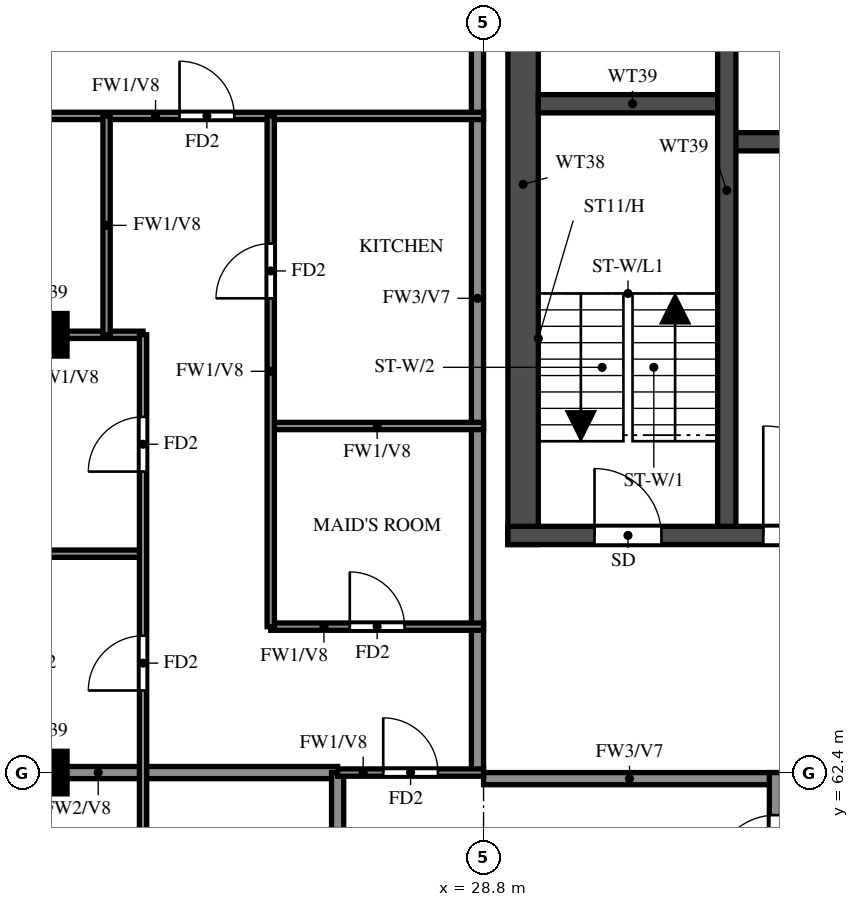
"""IFC4 building model, lengths in metres.
Left out: names, types, materials, properties, quantities, classifications, styles, units other than length and angle.
Written with IfcOpenShell. Run it as: python <this file> out.ifc"""

import sys

from ifc_helpers import new_model, si_unit, direction, frame, frame_2d, origin, origin_2d, place, context, subcontext, project, spatial, rectangle, extrude, source, transform, mapped, element, fill, save


model = new_model("IFC4")
c1 = context("Model", 3, precision=1e-05, world=origin(), true_north=direction((0.0, 1.0)))
c2 = subcontext(c1, "Body", "Model", "MODEL_VIEW")
j1 = project(units=[si_unit("LENGTHUNIT", "METRE"), si_unit("PLANEANGLEUNIT", "RADIAN")], contexts=[c1])
p1 = place(None, origin())
s1 = spatial("IfcSite", under=j1, at=p1, CompositionType="ELEMENT")
p2 = place(p1, origin())
s2 = spatial("IfcBuilding", under=s1, at=p2, CompositionType="ELEMENT")
p3 = place(p2, frame((0.0, 0.0, 267.5)))
s3 = spatial("IfcBuildingStorey", under=s2, at=p3, CompositionType="ELEMENT", Elevation=267.5)
m1 = source(origin(), c2, "Body", "SweptSolid", [
    extrude(rectangle(XDim=0.7, YDim=0.7, at=origin_2d()), origin(), (0.0, 0.0, 1.0), 3.099),
])
for number, where, z_axis, x_axis in (
    (1, (21.6, 62.4, 0.0), (0.0, 0.0, 1.0), (1.0, 0.0, 0.0)),
    (2, (21.6, 69.6, 0.0), (0.0, 0.0, 1.0), (1.0, 0.0, 0.0)),
):
    element("IfcColumn", number, at=place(p3, frame(where, z_axis=z_axis, x_axis=x_axis)), inside=s3, PredefinedType="COLUMN", context=c2, shape_type="MappedRepresentation", body=[
        mapped(m1, transform((0.0, 0.0, 0.0))),
    ])
p4 = place(p3, frame((29.45, 66.15, 0.0), z_axis=(0.0, 0.0, 1.0), x_axis=(0.0, 1.0, 0.0)))
e3 = element("IfcWall", 3, at=p4, inside=s3, PredefinedType="SHEAR", context=c2, shape_type="SweptSolid", body=[
    extrude(rectangle(XDim=11.85, YDim=0.5, at=frame_2d((5.925, 0.0))), origin(), (0.0, 0.0, 1.0), 3.099),
])
p5 = place(p3, frame((29.2, 66.3, 0.0), z_axis=(0.0, 0.0, 1.0), x_axis=(1.0, 0.0, 0.0)))
e4 = element("IfcWall", 4, at=p5, inside=s3, PredefinedType="SHEAR", context=c2, shape_type="SweptSolid", body=[
    extrude(rectangle(XDim=42.4, YDim=0.3, at=frame_2d((21.2, 0.0))), origin(), (0.0, 0.0, 1.0), 3.099),
])
p6 = place(p5, frame((1.425, 0.0, 0.0)))
e5 = element("IfcOpeningElement", 5, at=p6, cuts=e4, PredefinedType="OPENING", context=c2, shape_type="SweptSolid", body=[
    extrude(rectangle(XDim=1.1, YDim=2.1, at=frame_2d((0.55, 1.05))), frame((0.0, 0.16, 0.0), z_axis=(0.0, -1.0, 0.0), x_axis=(1.0, 0.0, 0.0)), (0.0, 0.0, 1.0), 0.32),
])
p7 = place(p5, frame((4.2, 0.0, 0.0)))
e6 = element("IfcOpeningElement", 6, at=p7, cuts=e4, PredefinedType="OPENING", context=c2, shape_type="SweptSolid", body=[
    extrude(rectangle(XDim=1.8, YDim=2.1, at=frame_2d((0.9, 1.05))), frame((0.0, 0.16, 0.0), z_axis=(0.0, -1.0, 0.0), x_axis=(1.0, 0.0, 0.0)), (0.0, 0.0, 1.0), 0.32),
])
p8 = place(p3, frame((32.8, 72.775, 0.0), z_axis=(0.0, 0.0, 1.0), x_axis=(1.0, 0.0, 0.0)))
e7 = element("IfcWall", 7, at=p8, inside=s3, PredefinedType="SHEAR", context=c2, shape_type="SweptSolid", body=[
    extrude(rectangle(XDim=35.2, YDim=0.3, at=frame_2d((17.6, 0.0))), origin(), (0.0, 0.0, 1.0), 3.099),
])
p9 = place(p8, frame((19.8, 0.0, 0.0)))
e8 = element("IfcOpeningElement", 8, at=p9, cuts=e7, PredefinedType="OPENING", context=c2, shape_type="SweptSolid", body=[
    extrude(rectangle(XDim=1.1, YDim=2.1, at=frame_2d((0.55, 1.05))), frame((0.0, 0.16, 0.0), z_axis=(0.0, -1.0, 0.0), x_axis=(1.0, 0.0, 0.0)), (0.0, 0.0, 1.0), 0.32),
])
p10 = place(p8, frame((27.725, 0.0, 0.0)))
e9 = element("IfcOpeningElement", 9, at=p10, cuts=e7, PredefinedType="OPENING", context=c2, shape_type="SweptSolid", body=[
    extrude(rectangle(XDim=1.1, YDim=2.1, at=frame_2d((0.55, 1.05))), frame((0.0, 0.16, 0.0), z_axis=(0.0, -1.0, 0.0), x_axis=(1.0, 0.0, 0.0)), (0.0, 0.0, 1.0), 0.32),
])
p11 = place(p8, frame((30.325, 0.0, 0.0)))
e10 = element("IfcOpeningElement", 10, at=p11, cuts=e7, PredefinedType="OPENING", context=c2, shape_type="SweptSolid", body=[
    extrude(rectangle(XDim=1.1, YDim=2.1, at=frame_2d((0.55, 1.05))), frame((0.0, 0.16, 0.0), z_axis=(0.0, -1.0, 0.0), x_axis=(1.0, 0.0, 0.0)), (0.0, 0.0, 1.0), 0.32),
])
p12 = place(p8, frame((3.825, 0.0, 0.0)))
e11 = element("IfcOpeningElement", 11, at=p12, cuts=e7, PredefinedType="OPENING", context=c2, shape_type="SweptSolid", body=[
    extrude(rectangle(XDim=1.1, YDim=2.1, at=frame_2d((0.55, 1.05))), frame((0.0, 0.16, 0.0), z_axis=(0.0, -1.0, 0.0), x_axis=(1.0, 0.0, 0.0)), (0.0, 0.0, 1.0), 0.32),
])
p13 = place(p8, frame((6.575, 0.0, 0.0)))
e12 = element("IfcOpeningElement", 12, at=p13, cuts=e7, PredefinedType="OPENING", context=c2, shape_type="SweptSolid", body=[
    extrude(rectangle(XDim=1.1, YDim=2.1, at=frame_2d((0.55, 1.05))), frame((0.0, 0.16, 0.0), z_axis=(0.0, -1.0, 0.0), x_axis=(1.0, 0.0, 0.0)), (0.0, 0.0, 1.0), 0.32),
])
p14 = place(p8, frame((9.325, 0.0, 0.0)))
e13 = element("IfcOpeningElement", 13, at=p14, cuts=e7, PredefinedType="OPENING", context=c2, shape_type="SweptSolid", body=[
    extrude(rectangle(XDim=1.1, YDim=2.1, at=frame_2d((0.55, 1.05))), frame((0.0, 0.16, 0.0), z_axis=(0.0, -1.0, 0.0), x_axis=(1.0, 0.0, 0.0)), (0.0, 0.0, 1.0), 0.32),
])
p15 = place(p8, frame((12.075, 0.0, 0.0)))
e14 = element("IfcOpeningElement", 14, at=p15, cuts=e7, PredefinedType="OPENING", context=c2, shape_type="SweptSolid", body=[
    extrude(rectangle(XDim=1.1, YDim=2.1, at=frame_2d((0.55, 1.05))), frame((0.0, 0.16, 0.0), z_axis=(0.0, -1.0, 0.0), x_axis=(1.0, 0.0, 0.0)), (0.0, 0.0, 1.0), 0.32),
])
p16 = place(p8, frame((14.825, 0.0, 0.0)))
e15 = element("IfcOpeningElement", 15, at=p16, cuts=e7, PredefinedType="OPENING", context=c2, shape_type="SweptSolid", body=[
    extrude(rectangle(XDim=1.1, YDim=2.1, at=frame_2d((0.55, 1.05))), frame((0.0, 0.16, 0.0), z_axis=(0.0, -1.0, 0.0), x_axis=(1.0, 0.0, 0.0)), (0.0, 0.0, 1.0), 0.32),
])
p17 = place(p8, frame((17.575, 0.0, 0.0)))
e16 = element("IfcOpeningElement", 16, at=p17, cuts=e7, PredefinedType="OPENING", context=c2, shape_type="SweptSolid", body=[
    extrude(rectangle(XDim=1.1, YDim=2.1, at=frame_2d((0.55, 1.05))), frame((0.0, 0.16, 0.0), z_axis=(0.0, -1.0, 0.0), x_axis=(1.0, 0.0, 0.0)), (0.0, 0.0, 1.0), 0.32),
])
p18 = place(p8, frame((0.95, 0.0, 0.0)))
e17 = element("IfcOpeningElement", 17, at=p18, cuts=e7, PredefinedType="OPENING", context=c2, shape_type="SweptSolid", body=[
    extrude(rectangle(XDim=1.1, YDim=2.1, at=frame_2d((0.55, 1.05))), frame((0.0, 0.16, 0.0), z_axis=(0.0, -1.0, 0.0), x_axis=(1.0, 0.0, 0.0)), (0.0, 0.0, 1.0), 0.32),
])
p19 = place(p3, frame((29.7, 73.4, 0.0), z_axis=(0.0, 0.0, 1.0), x_axis=(1.0, 0.0, 0.0)))
e18 = element("IfcWall", 18, at=p19, inside=s3, PredefinedType="SHEAR", context=c2, shape_type="SweptSolid", body=[
    extrude(rectangle(XDim=3.1, YDim=0.3, at=frame_2d((1.55, 0.0))), origin(), (0.0, 0.0, 1.0), 3.099),
])
p20 = place(p3, frame((32.8, 66.45, 0.0), z_axis=(0.0, 0.0, 1.0), x_axis=(0.0, 1.0, 0.0)))
e19 = element("IfcWall", 19, at=p20, inside=s3, PredefinedType="SHEAR", context=c2, shape_type="SweptSolid", body=[
    extrude(rectangle(XDim=11.05, YDim=0.3, at=frame_2d((5.525, 0.0))), origin(), (0.0, 0.0, 1.0), 3.099),
])
p21 = place(p3, frame((28.8, 62.3, 0.0), z_axis=(0.0, 0.0, 1.0), x_axis=(1.0, 0.0, 0.0)))
e20 = element("IfcWall", 20, at=p21, inside=s3, PredefinedType="SOLIDWALL", context=c2, shape_type="SweptSolid", body=[
    extrude(rectangle(XDim=4.8, YDim=0.2, at=frame_2d((2.4, 0.0))), origin(), (0.0, 0.0, 1.0), 3.099),
])
p22 = place(p3, frame((28.7, 62.4, 0.0), z_axis=(0.0, 0.0, 1.0), x_axis=(0.0, 1.0, 0.0)))
e21 = element("IfcWall", 21, at=p22, inside=s3, PredefinedType="SOLIDWALL", context=c2, shape_type="SweptSolid", body=[
    extrude(rectangle(XDim=15.6, YDim=0.2, at=frame_2d((7.8, 0.0))), origin(), (0.0, 0.0, 1.0), 3.099),
])
p23 = place(p3, frame((33.6, 45.6, 0.0), z_axis=(0.0, 0.0, 1.0), x_axis=(0.0, 1.0, 0.0)))
e22 = element("IfcWall", 22, at=p23, inside=s3, PredefinedType="SOLIDWALL", context=c2, shape_type="SweptSolid", body=[
    extrude(rectangle(XDim=16.8, YDim=0.2, at=frame_2d((8.4, 0.0))), origin(), (0.0, 0.0, 1.0), 3.099),
])
p24 = place(p23, frame((0.7, 0.0, 0.0)))
e23 = element("IfcOpeningElement", 23, at=p24, cuts=e22, PredefinedType="OPENING", context=c2, shape_type="SweptSolid", body=[
    extrude(rectangle(XDim=1.0, YDim=2.1, at=frame_2d((0.5, 1.05))), frame((0.0, 0.11, 0.0), z_axis=(0.0, -1.0, 0.0), x_axis=(1.0, 0.0, 0.0)), (0.0, 0.0, 1.0), 0.22),
])
p25 = place(p23, frame((8.3, 0.0, 0.0)))
e24 = element("IfcOpeningElement", 24, at=p25, cuts=e22, PredefinedType="OPENING", context=c2, shape_type="SweptSolid", body=[
    extrude(rectangle(XDim=1.0, YDim=2.1, at=frame_2d((0.5, 1.05))), frame((0.0, 0.11, 0.0), z_axis=(0.0, -1.0, 0.0), x_axis=(1.0, 0.0, 0.0)), (0.0, 0.0, 1.0), 0.22),
])
p26 = place(p23, frame((15.1, 0.0, 0.0)))
e25 = element("IfcOpeningElement", 25, at=p26, cuts=e22, PredefinedType="OPENING", context=c2, shape_type="SweptSolid", body=[
    extrude(rectangle(XDim=1.0, YDim=2.1, at=frame_2d((0.5, 1.05))), frame((0.0, 0.11, 0.0), z_axis=(0.0, -1.0, 0.0), x_axis=(1.0, 0.0, 0.0)), (0.0, 0.0, 1.0), 0.22),
])
p27 = place(p3, frame((18.525, 62.4, 0.0), z_axis=(0.0, 0.0, 1.0), x_axis=(1.0, 0.0, 0.0)))
e26 = element("IfcWall", 26, at=p27, inside=s3, PredefinedType="SOLIDWALL", context=c2, shape_type="SweptSolid", body=[
    extrude(rectangle(XDim=7.875, YDim=0.2, at=frame_2d((3.938, 0.0))), origin(), (0.0, 0.0, 1.0), 3.099),
])
p28 = place(p3, frame((26.4, 60.0, 0.0), z_axis=(0.0, 0.0, 1.0), x_axis=(0.0, 1.0, 0.0)))
e27 = element("IfcWall", 27, at=p28, inside=s3, PredefinedType="SOLIDWALL", context=c2, shape_type="SweptSolid", body=[
    extrude(rectangle(XDim=2.4, YDim=0.2, at=frame_2d((1.2, 0.0))), origin(), (0.0, 0.0, 1.0), 3.099),
])
p29 = place(p3, frame((26.4, 62.4, 0.0), z_axis=(0.0, 0.0, 1.0), x_axis=(1.0, 0.0, 0.0)))
e28 = element("IfcWall", 28, at=p29, inside=s3, PredefinedType="PARTITIONING", context=c2, shape_type="SweptSolid", body=[
    extrude(rectangle(XDim=2.4, YDim=0.12, at=frame_2d((1.2, 0.0))), origin(), (0.0, 0.0, 1.0), 3.099),
])
p30 = place(p29, frame((0.75, 0.0, 0.0)))
e29 = element("IfcOpeningElement", 29, at=p30, cuts=e28, PredefinedType="OPENING", context=c2, shape_type="SweptSolid", body=[
    extrude(rectangle(XDim=0.9, YDim=2.1, at=frame_2d((0.45, 1.05))), frame((0.0, 0.07, 0.0), z_axis=(0.0, -1.0, 0.0), x_axis=(1.0, 0.0, 0.0)), (0.0, 0.0, 1.0), 0.14),
])
p31 = place(p3, frame((25.3, 64.8, 0.0), z_axis=(0.0, 0.0, 1.0), x_axis=(1.0, 0.0, 0.0)))
e30 = element("IfcWall", 30, at=p31, inside=s3, PredefinedType="PARTITIONING", context=c2, shape_type="SweptSolid", body=[
    extrude(rectangle(XDim=3.5, YDim=0.12, at=frame_2d((1.75, 0.0))), origin(), (0.0, 0.0, 1.0), 3.099),
])
p32 = place(p31, frame((1.3, 0.0, 0.0)))
e31 = element("IfcOpeningElement", 31, at=p32, cuts=e30, PredefinedType="OPENING", context=c2, shape_type="SweptSolid", body=[
    extrude(rectangle(XDim=0.9, YDim=2.1, at=frame_2d((0.45, 1.05))), frame((0.0, 0.07, 0.0), z_axis=(0.0, -1.0, 0.0), x_axis=(1.0, 0.0, 0.0)), (0.0, 0.0, 1.0), 0.14),
])
p33 = place(p3, frame((18.525, 66.0, 0.0), z_axis=(0.0, 0.0, 1.0), x_axis=(1.0, 0.0, 0.0)))
e32 = element("IfcWall", 32, at=p33, inside=s3, PredefinedType="PARTITIONING", context=c2, shape_type="SweptSolid", body=[
    extrude(rectangle(XDim=4.675, YDim=0.12, at=frame_2d((2.337, 0.0))), origin(), (0.0, 0.0, 1.0), 3.099),
])
p34 = place(p3, frame((25.3, 68.1, 0.0), z_axis=(0.0, 0.0, 1.0), x_axis=(1.0, 0.0, 0.0)))
e33 = element("IfcWall", 33, at=p34, inside=s3, PredefinedType="PARTITIONING", context=c2, shape_type="SweptSolid", body=[
    extrude(rectangle(XDim=3.5, YDim=0.12, at=frame_2d((1.75, 0.0))), origin(), (0.0, 0.0, 1.0), 3.099),
])
p35 = place(p3, frame((18.525, 69.6, 0.0), z_axis=(0.0, 0.0, 1.0), x_axis=(1.0, 0.0, 0.0)))
e34 = element("IfcWall", 34, at=p35, inside=s3, PredefinedType="PARTITIONING", context=c2, shape_type="SweptSolid", body=[
    extrude(rectangle(XDim=4.675, YDim=0.12, at=frame_2d((2.337, 0.0))), origin(), (0.0, 0.0, 1.0), 3.099),
])
p36 = place(p35, frame((1.538, 0.0, 0.0)))
e35 = element("IfcOpeningElement", 35, at=p36, cuts=e34, PredefinedType="OPENING", context=c2, shape_type="SweptSolid", body=[
    extrude(rectangle(XDim=0.8, YDim=2.1, at=frame_2d((0.4, 1.05))), frame((0.0, 0.07, 0.0), z_axis=(0.0, -1.0, 0.0), x_axis=(1.0, 0.0, 0.0)), (0.0, 0.0, 1.0), 0.14),
])
p37 = place(p3, frame((18.525, 73.2, 0.0), z_axis=(0.0, 0.0, 1.0), x_axis=(1.0, 0.0, 0.0)))
e36 = element("IfcWall", 36, at=p37, inside=s3, PredefinedType="PARTITIONING", context=c2, shape_type="SweptSolid", body=[
    extrude(rectangle(XDim=10.275, YDim=0.12, at=frame_2d((5.138, 0.0))), origin(), (0.0, 0.0, 1.0), 3.099),
])
p38 = place(p37, frame((5.275, 0.0, 0.0)))
e37 = element("IfcOpeningElement", 37, at=p38, cuts=e36, PredefinedType="OPENING", context=c2, shape_type="SweptSolid", body=[
    extrude(rectangle(XDim=0.9, YDim=2.1, at=frame_2d((0.45, 1.05))), frame((0.0, 0.07, 0.0), z_axis=(0.0, -1.0, 0.0), x_axis=(1.0, 0.0, 0.0)), (0.0, 0.0, 1.0), 0.14),
])
p39 = place(p3, frame((22.6, 69.6, 0.0), z_axis=(0.0, 0.0, 1.0), x_axis=(0.0, 1.0, 0.0)))
e38 = element("IfcWall", 38, at=p39, inside=s3, PredefinedType="PARTITIONING", context=c2, shape_type="SweptSolid", body=[
    extrude(rectangle(XDim=3.6, YDim=0.12, at=frame_2d((1.8, 0.0))), origin(), (0.0, 0.0, 1.0), 3.099),
])
p40 = place(p3, frame((23.2, 48.0, 0.0), z_axis=(0.0, 0.0, 1.0), x_axis=(0.0, 1.0, 0.0)))
e39 = element("IfcWall", 39, at=p40, inside=s3, PredefinedType="PARTITIONING", context=c2, shape_type="SweptSolid", body=[
    extrude(rectangle(XDim=21.6, YDim=0.12, at=frame_2d((10.8, 0.0))), origin(), (0.0, 0.0, 1.0), 3.099),
])
p41 = place(p40, frame((1.35, 0.0, 0.0)))
e40 = element("IfcOpeningElement", 40, at=p41, cuts=e39, PredefinedType="OPENING", context=c2, shape_type="SweptSolid", body=[
    extrude(rectangle(XDim=0.9, YDim=2.1, at=frame_2d((0.45, 1.05))), frame((0.0, 0.07, 0.0), z_axis=(0.0, -1.0, 0.0), x_axis=(1.0, 0.0, 0.0)), (0.0, 0.0, 1.0), 0.14),
])
p42 = place(p40, frame((7.95, 0.0, 0.0)))
e41 = element("IfcOpeningElement", 41, at=p42, cuts=e39, PredefinedType="OPENING", context=c2, shape_type="SweptSolid", body=[
    extrude(rectangle(XDim=1.5, YDim=2.1, at=frame_2d((0.75, 1.05))), frame((0.0, 0.07, 0.0), z_axis=(0.0, -1.0, 0.0), x_axis=(1.0, 0.0, 0.0)), (0.0, 0.0, 1.0), 0.14),
])
p43 = place(p40, frame((12.15, 0.0, 0.0)))
e42 = element("IfcOpeningElement", 42, at=p43, cuts=e39, PredefinedType="OPENING", context=c2, shape_type="SweptSolid", body=[
    extrude(rectangle(XDim=0.9, YDim=2.1, at=frame_2d((0.45, 1.05))), frame((0.0, 0.07, 0.0), z_axis=(0.0, -1.0, 0.0), x_axis=(1.0, 0.0, 0.0)), (0.0, 0.0, 1.0), 0.14),
])
p44 = place(p40, frame((15.75, 0.0, 0.0)))
e43 = element("IfcOpeningElement", 43, at=p44, cuts=e39, PredefinedType="OPENING", context=c2, shape_type="SweptSolid", body=[
    extrude(rectangle(XDim=0.9, YDim=2.1, at=frame_2d((0.45, 1.05))), frame((0.0, 0.07, 0.0), z_axis=(0.0, -1.0, 0.0), x_axis=(1.0, 0.0, 0.0)), (0.0, 0.0, 1.0), 0.14),
])
p45 = place(p40, frame((19.35, 0.0, 0.0)))
e44 = element("IfcOpeningElement", 44, at=p45, cuts=e39, PredefinedType="OPENING", context=c2, shape_type="SweptSolid", body=[
    extrude(rectangle(XDim=0.9, YDim=2.1, at=frame_2d((0.45, 1.05))), frame((0.0, 0.07, 0.0), z_axis=(0.0, -1.0, 0.0), x_axis=(1.0, 0.0, 0.0)), (0.0, 0.0, 1.0), 0.14),
])
p46 = place(p3, frame((25.3, 64.8, 0.0), z_axis=(0.0, 0.0, 1.0), x_axis=(0.0, 1.0, 0.0)))
e45 = element("IfcWall", 45, at=p46, inside=s3, PredefinedType="PARTITIONING", context=c2, shape_type="SweptSolid", body=[
    extrude(rectangle(XDim=8.4, YDim=0.12, at=frame_2d((4.2, 0.0))), origin(), (0.0, 0.0, 1.0), 3.099),
])
p47 = place(p46, frame((5.4, 0.0, 0.0)))
e46 = element("IfcOpeningElement", 46, at=p47, cuts=e45, PredefinedType="OPENING", context=c2, shape_type="SweptSolid", body=[
    extrude(rectangle(XDim=0.9, YDim=2.1, at=frame_2d((0.45, 1.05))), frame((0.0, 0.07, 0.0), z_axis=(0.0, -1.0, 0.0), x_axis=(1.0, 0.0, 0.0)), (0.0, 0.0, 1.0), 0.14),
])
p48 = place(p6, origin())
e47 = element("IfcDoor", 47, at=p48, inside=s3, OperationType="SINGLE_SWING_LEFT", PredefinedType="DOOR", context=c2, shape_type="SweptSolid", body=[
    extrude(rectangle(XDim=1.1, YDim=2.1, at=frame_2d((0.55, 1.05))), frame((0.0, 0.025, 0.0), z_axis=(0.0, -1.0, 0.0), x_axis=(1.0, 0.0, 0.0)), (0.0, 0.0, 1.0), 0.05),
])
fill(e5, e47)
p49 = place(p7, origin())
e48 = element("IfcDoor", 48, at=p49, inside=s3, OperationType="DOUBLE_DOOR_SINGLE_SWING", PredefinedType="DOOR", context=c2, shape_type="SweptSolid", body=[
    extrude(rectangle(XDim=1.8, YDim=2.1, at=frame_2d((0.9, 1.05))), frame((0.0, 0.025, 0.0), z_axis=(0.0, -1.0, 0.0), x_axis=(1.0, 0.0, 0.0)), (0.0, 0.0, 1.0), 0.05),
])
fill(e6, e48)
p50 = place(p30, origin())
e49 = element("IfcDoor", 49, at=p50, inside=s3, OperationType="SINGLE_SWING_RIGHT", PredefinedType="DOOR", context=c2, shape_type="SweptSolid", body=[
    extrude(rectangle(XDim=0.9, YDim=2.1, at=frame_2d((0.45, 1.05))), frame((0.0, 0.025, 0.0), z_axis=(0.0, -1.0, 0.0), x_axis=(1.0, 0.0, 0.0)), (0.0, 0.0, 1.0), 0.05),
])
fill(e29, e49)
p51 = place(p26, origin())
e50 = element("IfcDoor", 50, at=p51, inside=s3, OperationType="SINGLE_SWING_LEFT", PredefinedType="DOOR", context=c2, shape_type="SweptSolid", body=[
    extrude(rectangle(XDim=1.0, YDim=2.1, at=frame_2d((0.5, 1.05))), frame((0.0, 0.025, 0.0), z_axis=(0.0, -1.0, 0.0), x_axis=(1.0, 0.0, 0.0)), (0.0, 0.0, 1.0), 0.05),
])
fill(e25, e50)
p52 = place(p44, origin())
e51 = element("IfcDoor", 51, at=p52, inside=s3, OperationType="SINGLE_SWING_LEFT", PredefinedType="DOOR", context=c2, shape_type="SweptSolid", body=[
    extrude(rectangle(XDim=0.9, YDim=2.1, at=frame_2d((0.45, 1.05))), frame((0.0, 0.025, 0.0), z_axis=(0.0, -1.0, 0.0), x_axis=(1.0, 0.0, 0.0)), (0.0, 0.0, 1.0), 0.05),
])
fill(e43, e51)
p53 = place(p45, origin())
e52 = element("IfcDoor", 52, at=p53, inside=s3, OperationType="SINGLE_SWING_RIGHT", PredefinedType="DOOR", context=c2, shape_type="SweptSolid", body=[
    extrude(rectangle(XDim=0.9, YDim=2.1, at=frame_2d((0.45, 1.05))), frame((0.0, 0.025, 0.0), z_axis=(0.0, -1.0, 0.0), x_axis=(1.0, 0.0, 0.0)), (0.0, 0.0, 1.0), 0.05),
])
fill(e44, e52)
p54 = place(p38, origin())
e53 = element("IfcDoor", 53, at=p54, inside=s3, OperationType="SINGLE_SWING_LEFT", PredefinedType="DOOR", context=c2, shape_type="SweptSolid", body=[
    extrude(rectangle(XDim=0.9, YDim=2.1, at=frame_2d((0.45, 1.05))), frame((0.0, 0.025, 0.0), z_axis=(0.0, -1.0, 0.0), x_axis=(1.0, 0.0, 0.0)), (0.0, 0.0, 1.0), 0.05),
])
fill(e37, e53)
p55 = place(p32, origin())
e54 = element("IfcDoor", 54, at=p55, inside=s3, OperationType="SINGLE_SWING_RIGHT", PredefinedType="DOOR", context=c2, shape_type="SweptSolid", body=[
    extrude(rectangle(XDim=0.9, YDim=2.1, at=frame_2d((0.45, 1.05))), frame((0.0, 0.025, 0.0), z_axis=(0.0, -1.0, 0.0), x_axis=(1.0, 0.0, 0.0)), (0.0, 0.0, 1.0), 0.05),
])
fill(e31, e54)
p56 = place(p47, origin())
e55 = element("IfcDoor", 55, at=p56, inside=s3, OperationType="SINGLE_SWING_LEFT", PredefinedType="DOOR", context=c2, shape_type="SweptSolid", body=[
    extrude(rectangle(XDim=0.9, YDim=2.1, at=frame_2d((0.45, 1.05))), frame((0.0, 0.025, 0.0), z_axis=(0.0, -1.0, 0.0), x_axis=(1.0, 0.0, 0.0)), (0.0, 0.0, 1.0), 0.05),
])
fill(e46, e55)
save(model, sys.argv[1])
